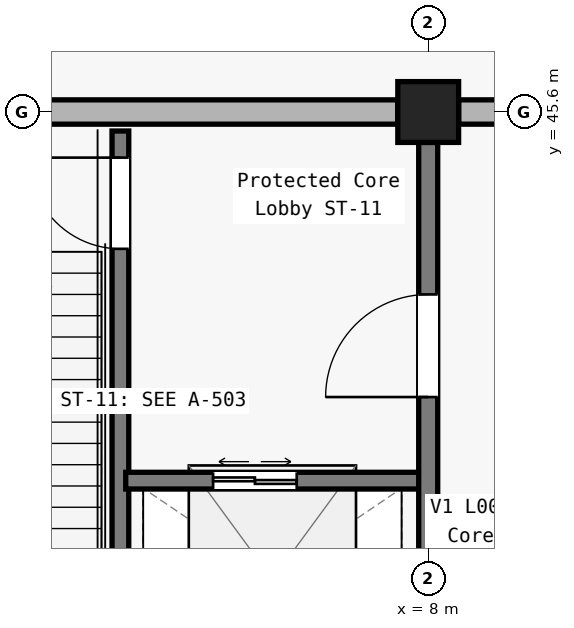
"""IFC4 building model, lengths in metres.
Left out: names, types, materials, properties, quantities, classifications, styles, units other than length and angle.
Written with IfcOpenShell. Run it as: python <this file> out.ifc"""

import sys

from ifc_helpers import new_model, si_unit, direction, frame, frame_2d, origin, origin_2d, place, context, subcontext, project, spatial, rectangle, extrude, element, fill, save


model = new_model("IFC4")
c1 = context("Model", 3, precision=1e-05, world=origin(), true_north=direction((0.0, 1.0)))
c2 = subcontext(c1, "Body", "Model", "MODEL_VIEW")
j1 = project(units=[si_unit("LENGTHUNIT", "METRE"), si_unit("PLANEANGLEUNIT", "RADIAN")], contexts=[c1])
p1 = place(None, origin())
s1 = spatial("IfcSite", under=j1, at=p1, CompositionType="ELEMENT")
p2 = place(p1, origin())
s2 = spatial("IfcBuilding", under=s1, at=p2, CompositionType="ELEMENT")
p3 = place(p2, origin())
s3 = spatial("IfcBuildingStorey", under=s2, at=p3, CompositionType="ELEMENT", Elevation=0.0)
p4 = place(p3, frame((8.0, 45.6, 0.0), z_axis=(0.0, 0.0, 1.0), x_axis=(1.0, 0.0, 0.0)))
e1 = element("IfcColumn", 1, at=p4, inside=s3, PredefinedType="COLUMN", context=c2, shape_type="SweptSolid", body=[
    extrude(rectangle(XDim=0.8, YDim=0.8, at=origin_2d()), origin(), (0.0, 0.0, 1.0), 5.4),
])
p5 = place(p3, frame((0.325, 45.6, 0.0), z_axis=(0.0, 0.0, 1.0), x_axis=(1.0, 0.0, 0.0)))
e2 = element("IfcWall", 2, at=p5, inside=s3, PredefinedType="SOLIDWALL", context=c2, shape_type="SweptSolid", body=[
    extrude(rectangle(XDim=7.275, YDim=0.32, at=frame_2d((3.638, 0.0))), origin(), (0.0, 0.0, 1.0), 4.49),
])
p6 = place(p5, frame((0.65, 0.0, 0.0)))
e3 = element("IfcOpeningElement", 3, at=p6, cuts=e2, PredefinedType="OPENING", context=c2, shape_type="SweptSolid", body=[
    extrude(rectangle(XDim=1.6, YDim=2.2, at=frame_2d((0.8, 1.1))), frame((0.0, 0.17, 0.0), z_axis=(0.0, -1.0, 0.0), x_axis=(1.0, 0.0, 0.0)), (0.0, 0.0, 1.0), 0.34),
])
p7 = place(p3, frame((8.4, 45.6, 0.0), z_axis=(0.0, 0.0, 1.0), x_axis=(1.0, 0.0, 0.0)))
e4 = element("IfcWall", 4, at=p7, inside=s3, PredefinedType="SOLIDWALL", context=c2, shape_type="SweptSolid", body=[
    extrude(rectangle(XDim=7.25, YDim=0.32, at=frame_2d((3.625, 0.0))), origin(), (0.0, 0.0, 1.0), 4.44),
])
p8 = place(p7, frame((3.85, 0.0, 0.95)))
e5 = element("IfcOpeningElement", 5, at=p8, cuts=e4, PredefinedType="OPENING", context=c2, shape_type="SweptSolid", body=[
    extrude(rectangle(XDim=1.6, YDim=1.65, at=frame_2d((0.8, 0.825))), frame((0.0, 0.17, 0.0), z_axis=(0.0, -1.0, 0.0), x_axis=(1.0, 0.0, 0.0)), (0.0, 0.0, 1.0), 0.34),
])
p9 = place(p3, frame((3.95, 38.25, 0.0), z_axis=(0.0, 0.0, 1.0), x_axis=(0.0, 1.0, 0.0)))
e6 = element("IfcWall", 6, at=p9, inside=s3, PredefinedType="SOLIDWALL", context=c2, shape_type="SweptSolid", body=[
    extrude(rectangle(XDim=7.1, YDim=0.22, at=frame_2d((3.55, 0.0))), origin(), (0.0, 0.0, 1.0), 5.1),
])
p10 = place(p9, frame((5.55, 0.0, 0.0)))
e7 = element("IfcOpeningElement", 7, at=p10, cuts=e6, PredefinedType="OPENING", context=c2, shape_type="SweptSolid", body=[
    extrude(rectangle(XDim=1.2, YDim=2.15, at=frame_2d((0.6, 1.075))), frame((0.0, 0.12, 0.0), z_axis=(0.0, -1.0, 0.0), x_axis=(1.0, 0.0, 0.0)), (0.0, 0.0, 1.0), 0.24),
])
p11 = place(p3, frame((4.02, 40.75, 0.0), z_axis=(0.0, 0.0, 1.0), x_axis=(1.0, 0.0, 0.0)))
e8 = element("IfcWall", 8, at=p11, inside=s3, PredefinedType="SOLIDWALL", context=c2, shape_type="SweptSolid", body=[
    extrude(rectangle(XDim=3.93, YDim=0.22, at=frame_2d((1.965, 0.0))), origin(), (0.0, 0.0, 1.0), 4.45),
])
p12 = place(p11, frame((1.15, 0.0, 0.0)))
e9 = element("IfcOpeningElement", 9, at=p12, cuts=e8, PredefinedType="OPENING", context=c2, shape_type="SweptSolid", body=[
    extrude(rectangle(XDim=1.1, YDim=2.2, at=frame_2d((0.55, 1.1))), frame((0.0, 0.12, 0.0), z_axis=(0.0, -1.0, 0.0), x_axis=(1.0, 0.0, 0.0)), (0.0, 0.0, 1.0), 0.24),
])
p13 = place(p3, frame((8.0, 38.325, 0.0), z_axis=(0.0, 0.0, 1.0), x_axis=(0.0, 1.0, 0.0)))
e10 = element("IfcWall", 10, at=p13, inside=s3, PredefinedType="SOLIDWALL", context=c2, shape_type="SweptSolid", body=[
    extrude(rectangle(XDim=6.875, YDim=0.25, at=frame_2d((3.438, 0.0))), origin(), (0.0, 0.0, 1.0), 4.235),
])
p14 = place(p13, frame((3.525, 0.0, 0.0)))
e11 = element("IfcOpeningElement", 11, at=p14, cuts=e10, PredefinedType="OPENING", context=c2, shape_type="SweptSolid", body=[
    extrude(rectangle(XDim=1.35, YDim=2.2, at=frame_2d((0.675, 1.1))), frame((0.0, 0.135, 0.0), z_axis=(0.0, -1.0, 0.0), x_axis=(1.0, 0.0, 0.0)), (0.0, 0.0, 1.0), 0.27),
])
p15 = place(p10, origin())
e12 = element("IfcDoor", 12, at=p15, inside=s3, OperationType="SINGLE_SWING_RIGHT", PredefinedType="DOOR", context=c2, shape_type="SweptSolid", body=[
    extrude(rectangle(XDim=1.2, YDim=2.15, at=frame_2d((0.6, 1.075))), frame((0.0, 0.025, 0.0), z_axis=(0.0, -1.0, 0.0), x_axis=(1.0, 0.0, 0.0)), (0.0, 0.0, 1.0), 0.05),
])
fill(e7, e12)
p16 = place(p12, origin())
e13 = element("IfcDoor", 13, at=p16, inside=s3, OperationType="DOUBLE_DOOR_SLIDING", PredefinedType="DOOR", context=c2, shape_type="SweptSolid", body=[
    extrude(rectangle(XDim=1.1, YDim=2.2, at=frame_2d((0.55, 1.1))), frame((0.0, 0.025, 0.0), z_axis=(0.0, -1.0, 0.0), x_axis=(1.0, 0.0, 0.0)), (0.0, 0.0, 1.0), 0.05),
])
fill(e9, e13)
p17 = place(p14, origin())
e14 = element("IfcDoor", 14, at=p17, inside=s3, OperationType="SINGLE_SWING_LEFT", PredefinedType="DOOR", context=c2, shape_type="SweptSolid", body=[
    extrude(rectangle(XDim=1.35, YDim=2.2, at=frame_2d((0.675, 1.1))), frame((0.0, 0.025, 0.0), z_axis=(0.0, -1.0, 0.0), x_axis=(1.0, 0.0, 0.0)), (0.0, 0.0, 1.0), 0.05),
])
fill(e11, e14)
save(model, sys.argv[1])
